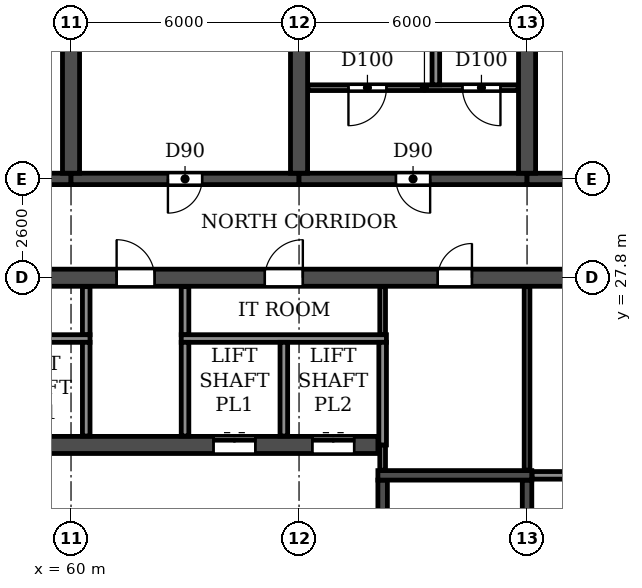
"""IFC4 building model, lengths in metres.
Left out: names, types, materials, properties, quantities, classifications, styles, units other than length and angle.
Written with IfcOpenShell. Run it as: python <this file> out.ifc"""

import sys

from ifc_helpers import new_model, si_unit, direction, frame, frame_2d, origin, place, context, subcontext, project, spatial, rectangle, extrude, element, fill, save


model = new_model("IFC4")
c1 = context("Model", 3, precision=1e-05, world=origin(), true_north=direction((0.0, 1.0)))
c2 = subcontext(c1, "Body", "Model", "MODEL_VIEW")
j1 = project(units=[si_unit("LENGTHUNIT", "METRE"), si_unit("PLANEANGLEUNIT", "RADIAN")], contexts=[c1])
p1 = place(None, origin())
s1 = spatial("IfcSite", under=j1, at=p1, CompositionType="ELEMENT")
p2 = place(p1, origin())
s2 = spatial("IfcBuilding", under=s1, at=p2, CompositionType="ELEMENT")
p3 = place(p2, frame((0.0, 0.0, 10.8)))
s3 = spatial("IfcBuildingStorey", under=s2, at=p3, CompositionType="ELEMENT", Elevation=10.8)
for number, where, z_axis, x_axis in (
    (1, (60.0, 30.55, 0.0), (0.0, 0.0, 1.0), (0.0, 1.0, 0.0)),
    (2, (66.0, 30.55, 0.0), (0.0, 0.0, 1.0), (0.0, 1.0, 0.0)),
    (3, (72.0, 30.55, 0.0), (0.0, 0.0, 1.0), (0.0, 1.0, 0.0)),
):
    element("IfcWall", number, at=place(p3, frame(where, z_axis=z_axis, x_axis=x_axis)), inside=s3, PredefinedType="SHEAR", context=c2, shape_type="SweptSolid", body=[
        extrude(rectangle(XDim=14.05, YDim=0.45, at=frame_2d((7.025, 0.0))), origin(), (0.0, 0.0, 1.0), 3.92),
    ])
p4 = place(p3, frame((54.0, 30.4, 0.0), z_axis=(0.0, 0.0, 1.0), x_axis=(1.0, 0.0, 0.0)))
e4 = element("IfcWall", 4, at=p4, inside=s3, PredefinedType="SHEAR", context=c2, shape_type="SweptSolid", body=[
    extrude(rectangle(XDim=6.0, YDim=0.3, at=frame_2d((3.0, 0.0))), origin(), (0.0, 0.0, 1.0), 3.32),
])
p5 = place(p4, frame((1.4, 0.0, 0.0)))
e5 = element("IfcOpeningElement", 5, at=p5, cuts=e4, PredefinedType="OPENING", context=c2, shape_type="SweptSolid", body=[
    extrude(rectangle(XDim=1.0, YDim=2.1, at=frame_2d((0.5, 1.05))), frame((0.0, 0.16, 0.0), z_axis=(0.0, -1.0, 0.0), x_axis=(1.0, 0.0, 0.0)), (0.0, 0.0, 1.0), 0.32),
])
p6 = place(p4, frame((4.45, 0.0, 0.0)))
e6 = element("IfcOpeningElement", 6, at=p6, cuts=e4, PredefinedType="OPENING", context=c2, shape_type="SweptSolid", body=[
    extrude(rectangle(XDim=0.9, YDim=2.1, at=frame_2d((0.45, 1.05))), frame((0.0, 0.16, 0.0), z_axis=(0.0, -1.0, 0.0), x_axis=(1.0, 0.0, 0.0)), (0.0, 0.0, 1.0), 0.32),
])
p7 = place(p3, frame((60.0, 30.4, 0.0), z_axis=(0.0, 0.0, 1.0), x_axis=(1.0, 0.0, 0.0)))
e7 = element("IfcWall", 7, at=p7, inside=s3, PredefinedType="SHEAR", context=c2, shape_type="SweptSolid", body=[
    extrude(rectangle(XDim=6.0, YDim=0.3, at=frame_2d((3.0, 0.0))), origin(), (0.0, 0.0, 1.0), 3.32),
])
p8 = place(p7, frame((2.55, 0.0, 0.0)))
e8 = element("IfcOpeningElement", 8, at=p8, cuts=e7, PredefinedType="OPENING", context=c2, shape_type="SweptSolid", body=[
    extrude(rectangle(XDim=0.9, YDim=2.1, at=frame_2d((0.45, 1.05))), frame((0.0, 0.16, 0.0), z_axis=(0.0, -1.0, 0.0), x_axis=(1.0, 0.0, 0.0)), (0.0, 0.0, 1.0), 0.32),
])
p9 = place(p3, frame((66.0, 30.4, 0.0), z_axis=(0.0, 0.0, 1.0), x_axis=(1.0, 0.0, 0.0)))
e9 = element("IfcWall", 9, at=p9, inside=s3, PredefinedType="SHEAR", context=c2, shape_type="SweptSolid", body=[
    extrude(rectangle(XDim=6.0, YDim=0.3, at=frame_2d((3.0, 0.0))), origin(), (0.0, 0.0, 1.0), 3.32),
])
p10 = place(p9, frame((2.55, 0.0, 0.0)))
e10 = element("IfcOpeningElement", 10, at=p10, cuts=e9, PredefinedType="OPENING", context=c2, shape_type="SweptSolid", body=[
    extrude(rectangle(XDim=0.9, YDim=2.1, at=frame_2d((0.45, 1.05))), frame((0.0, 0.16, 0.0), z_axis=(0.0, -1.0, 0.0), x_axis=(1.0, 0.0, 0.0)), (0.0, 0.0, 1.0), 0.32),
])
p11 = place(p3, frame((72.0, 30.4, 0.0), z_axis=(0.0, 0.0, 1.0), x_axis=(1.0, 0.0, 0.0)))
e11 = element("IfcWall", 11, at=p11, inside=s3, PredefinedType="SHEAR", context=c2, shape_type="SweptSolid", body=[
    extrude(rectangle(XDim=6.0, YDim=0.3, at=frame_2d((3.0, 0.0))), origin(), (0.0, 0.0, 1.0), 3.32),
])
p12 = place(p11, frame((2.55, 0.0, 0.0)))
e12 = element("IfcOpeningElement", 12, at=p12, cuts=e11, PredefinedType="OPENING", context=c2, shape_type="SweptSolid", body=[
    extrude(rectangle(XDim=0.9, YDim=2.1, at=frame_2d((0.45, 1.05))), frame((0.0, 0.16, 0.0), z_axis=(0.0, -1.0, 0.0), x_axis=(1.0, 0.0, 0.0)), (0.0, 0.0, 1.0), 0.32),
])
p13 = place(p3, frame((18.0, 27.8, 0.0), z_axis=(0.0, 0.0, 1.0), x_axis=(1.0, 0.0, 0.0)))
e13 = element("IfcWall", 13, at=p13, inside=s3, PredefinedType="SOLIDWALL", context=c2, shape_type="SweptSolid", body=[
    extrude(rectangle(XDim=66.0, YDim=0.45, at=frame_2d((33.0, 0.0))), origin(), (0.0, 0.0, 1.0), 3.92),
])
p14 = place(p13, frame((0.9, 0.0, 0.0)))
e14 = element("IfcOpeningElement", 14, at=p14, cuts=e13, PredefinedType="OPENING", context=c2, shape_type="SweptSolid", body=[
    extrude(rectangle(XDim=1.0, YDim=2.1, at=frame_2d((0.5, 1.05))), frame((0.0, 0.235, 0.0), z_axis=(0.0, -1.0, 0.0), x_axis=(1.0, 0.0, 0.0)), (0.0, 0.0, 1.0), 0.47),
])
p15 = place(p13, frame((4.25, 0.0, 0.0)))
e15 = element("IfcOpeningElement", 15, at=p15, cuts=e13, PredefinedType="OPENING", context=c2, shape_type="SweptSolid", body=[
    extrude(rectangle(XDim=0.9, YDim=2.1, at=frame_2d((0.45, 1.05))), frame((0.0, 0.235, 0.0), z_axis=(0.0, -1.0, 0.0), x_axis=(1.0, 0.0, 0.0)), (0.0, 0.0, 1.0), 0.47),
])
p16 = place(p13, frame((8.85, 0.0, 0.0)))
e16 = element("IfcOpeningElement", 16, at=p16, cuts=e13, PredefinedType="OPENING", context=c2, shape_type="SweptSolid", body=[
    extrude(rectangle(XDim=0.9, YDim=2.1, at=frame_2d((0.45, 1.05))), frame((0.0, 0.235, 0.0), z_axis=(0.0, -1.0, 0.0), x_axis=(1.0, 0.0, 0.0)), (0.0, 0.0, 1.0), 0.47),
])
p17 = place(p13, frame((13.45, 0.0, 0.0)))
e17 = element("IfcOpeningElement", 17, at=p17, cuts=e13, PredefinedType="OPENING", context=c2, shape_type="SweptSolid", body=[
    extrude(rectangle(XDim=0.9, YDim=2.1, at=frame_2d((0.45, 1.05))), frame((0.0, 0.235, 0.0), z_axis=(0.0, -1.0, 0.0), x_axis=(1.0, 0.0, 0.0)), (0.0, 0.0, 1.0), 0.47),
])
p18 = place(p13, frame((18.95, 0.0, 0.0)))
e18 = element("IfcOpeningElement", 18, at=p18, cuts=e13, PredefinedType="OPENING", context=c2, shape_type="SweptSolid", body=[
    extrude(rectangle(XDim=1.5, YDim=2.1, at=frame_2d((0.75, 1.05))), frame((0.0, 0.235, 0.0), z_axis=(0.0, -1.0, 0.0), x_axis=(1.0, 0.0, 0.0)), (0.0, 0.0, 1.0), 0.47),
])
p19 = place(p13, frame((24.4, 0.0, 0.0)))
e19 = element("IfcOpeningElement", 19, at=p19, cuts=e13, PredefinedType="OPENING", context=c2, shape_type="SweptSolid", body=[
    extrude(rectangle(XDim=1.0, YDim=2.1, at=frame_2d((0.5, 1.05))), frame((0.0, 0.235, 0.0), z_axis=(0.0, -1.0, 0.0), x_axis=(1.0, 0.0, 0.0)), (0.0, 0.0, 1.0), 0.47),
])
p20 = place(p13, frame((29.6, 0.0, 0.0)))
e20 = element("IfcOpeningElement", 20, at=p20, cuts=e13, PredefinedType="OPENING", context=c2, shape_type="SweptSolid", body=[
    extrude(rectangle(XDim=1.0, YDim=2.1, at=frame_2d((0.5, 1.05))), frame((0.0, 0.235, 0.0), z_axis=(0.0, -1.0, 0.0), x_axis=(1.0, 0.0, 0.0)), (0.0, 0.0, 1.0), 0.47),
])
p21 = place(p13, frame((32.5, 0.0, 0.0)))
e21 = element("IfcOpeningElement", 21, at=p21, cuts=e13, PredefinedType="OPENING", context=c2, shape_type="SweptSolid", body=[
    extrude(rectangle(XDim=1.0, YDim=2.1, at=frame_2d((0.5, 1.05))), frame((0.0, 0.235, 0.0), z_axis=(0.0, -1.0, 0.0), x_axis=(1.0, 0.0, 0.0)), (0.0, 0.0, 1.0), 0.47),
])
p22 = place(p13, frame((38.0, 0.0, 0.0)))
e22 = element("IfcOpeningElement", 22, at=p22, cuts=e13, PredefinedType="OPENING", context=c2, shape_type="SweptSolid", body=[
    extrude(rectangle(XDim=1.0, YDim=2.1, at=frame_2d((0.5, 1.05))), frame((0.0, 0.235, 0.0), z_axis=(0.0, -1.0, 0.0), x_axis=(1.0, 0.0, 0.0)), (0.0, 0.0, 1.0), 0.47),
])
p23 = place(p13, frame((43.2, 0.0, 0.0)))
e23 = element("IfcOpeningElement", 23, at=p23, cuts=e13, PredefinedType="OPENING", context=c2, shape_type="SweptSolid", body=[
    extrude(rectangle(XDim=1.0, YDim=2.1, at=frame_2d((0.5, 1.05))), frame((0.0, 0.235, 0.0), z_axis=(0.0, -1.0, 0.0), x_axis=(1.0, 0.0, 0.0)), (0.0, 0.0, 1.0), 0.47),
])
p24 = place(p13, frame((47.1, 0.0, 0.0)))
e24 = element("IfcOpeningElement", 24, at=p24, cuts=e13, PredefinedType="OPENING", context=c2, shape_type="SweptSolid", body=[
    extrude(rectangle(XDim=1.0, YDim=2.1, at=frame_2d((0.5, 1.05))), frame((0.0, 0.235, 0.0), z_axis=(0.0, -1.0, 0.0), x_axis=(1.0, 0.0, 0.0)), (0.0, 0.0, 1.0), 0.47),
])
p25 = place(p13, frame((51.65, 0.0, 0.0)))
e25 = element("IfcOpeningElement", 25, at=p25, cuts=e13, PredefinedType="OPENING", context=c2, shape_type="SweptSolid", body=[
    extrude(rectangle(XDim=0.9, YDim=2.1, at=frame_2d((0.45, 1.05))), frame((0.0, 0.235, 0.0), z_axis=(0.0, -1.0, 0.0), x_axis=(1.0, 0.0, 0.0)), (0.0, 0.0, 1.0), 0.47),
])
p26 = place(p13, frame((56.2, 0.0, 0.0)))
e26 = element("IfcOpeningElement", 26, at=p26, cuts=e13, PredefinedType="OPENING", context=c2, shape_type="SweptSolid", body=[
    extrude(rectangle(XDim=1.0, YDim=2.1, at=frame_2d((0.5, 1.05))), frame((0.0, 0.235, 0.0), z_axis=(0.0, -1.0, 0.0), x_axis=(1.0, 0.0, 0.0)), (0.0, 0.0, 1.0), 0.47),
])
p27 = place(p13, frame((60.85, 0.0, 0.0)))
e27 = element("IfcOpeningElement", 27, at=p27, cuts=e13, PredefinedType="OPENING", context=c2, shape_type="SweptSolid", body=[
    extrude(rectangle(XDim=0.9, YDim=2.1, at=frame_2d((0.45, 1.05))), frame((0.0, 0.235, 0.0), z_axis=(0.0, -1.0, 0.0), x_axis=(1.0, 0.0, 0.0)), (0.0, 0.0, 1.0), 0.47),
])
p28 = place(p13, frame((64.1, 0.0, 0.0)))
e28 = element("IfcOpeningElement", 28, at=p28, cuts=e13, PredefinedType="OPENING", context=c2, shape_type="SweptSolid", body=[
    extrude(rectangle(XDim=1.0, YDim=2.1, at=frame_2d((0.5, 1.05))), frame((0.0, 0.235, 0.0), z_axis=(0.0, -1.0, 0.0), x_axis=(1.0, 0.0, 0.0)), (0.0, 0.0, 1.0), 0.47),
])
p29 = place(p3, frame((33.925, 23.4, 0.0), z_axis=(0.0, 0.0, 1.0), x_axis=(1.0, 0.0, 0.0)))
e29 = element("IfcWall", 29, at=p29, inside=s3, PredefinedType="SOLIDWALL", context=c2, shape_type="SweptSolid", body=[
    extrude(rectangle(XDim=34.15, YDim=0.45, at=frame_2d((17.075, 0.0))), origin(), (0.0, 0.0, 1.0), 3.92),
])
p30 = place(p29, frame((16.175, 0.0, 0.0)))
e30 = element("IfcOpeningElement", 30, at=p30, cuts=e29, PredefinedType="OPENING", context=c2, shape_type="SweptSolid", body=[
    extrude(rectangle(XDim=1.8, YDim=2.1, at=frame_2d((0.9, 1.05))), frame((0.0, 0.235, 0.0), z_axis=(0.0, -1.0, 0.0), x_axis=(1.0, 0.0, 0.0)), (0.0, 0.0, 1.0), 0.47),
])
p31 = place(p29, frame((11.025, 0.0, 0.0)))
e31 = element("IfcOpeningElement", 31, at=p31, cuts=e29, PredefinedType="OPENING", context=c2, shape_type="SweptSolid", body=[
    extrude(rectangle(XDim=1.1, YDim=2.1, at=frame_2d((0.55, 1.05))), frame((0.0, 0.235, 0.0), z_axis=(0.0, -1.0, 0.0), x_axis=(1.0, 0.0, 0.0)), (0.0, 0.0, 1.0), 0.47),
])
p32 = place(p29, frame((29.825, 0.0, 0.0)))
e32 = element("IfcOpeningElement", 32, at=p32, cuts=e29, PredefinedType="OPENING", context=c2, shape_type="SweptSolid", body=[
    extrude(rectangle(XDim=1.1, YDim=2.1, at=frame_2d((0.55, 1.05))), frame((0.0, 0.235, 0.0), z_axis=(0.0, -1.0, 0.0), x_axis=(1.0, 0.0, 0.0)), (0.0, 0.0, 1.0), 0.47),
])
p33 = place(p29, frame((32.425, 0.0, 0.0)))
e33 = element("IfcOpeningElement", 33, at=p33, cuts=e29, PredefinedType="OPENING", context=c2, shape_type="SweptSolid", body=[
    extrude(rectangle(XDim=1.1, YDim=2.1, at=frame_2d((0.55, 1.05))), frame((0.0, 0.235, 0.0), z_axis=(0.0, -1.0, 0.0), x_axis=(1.0, 0.0, 0.0)), (0.0, 0.0, 1.0), 0.47),
])
p34 = place(p3, frame((68.2, 14.825, 0.0), z_axis=(0.0, 0.0, 1.0), x_axis=(0.0, 1.0, 0.0)))
e34 = element("IfcWall", 34, at=p34, inside=s3, PredefinedType="SOLIDWALL", context=c2, shape_type="SweptSolid", body=[
    extrude(rectangle(XDim=7.65, YDim=0.25, at=frame_2d((3.825, 0.0))), origin(), (0.0, 0.0, 1.0), 3.92),
])
p35 = place(p34, frame((0.475, 0.0, 0.0)))
e35 = element("IfcOpeningElement", 35, at=p35, cuts=e34, PredefinedType="OPENING", context=c2, shape_type="SweptSolid", body=[
    extrude(rectangle(XDim=1.0, YDim=2.1, at=frame_2d((0.5, 1.05))), frame((0.0, 0.135, 0.0), z_axis=(0.0, -1.0, 0.0), x_axis=(1.0, 0.0, 0.0)), (0.0, 0.0, 1.0), 0.27),
])
p36 = place(p3, frame((72.0, 14.825, 0.0), z_axis=(0.0, 0.0, 1.0), x_axis=(0.0, 1.0, 0.0)))
e36 = element("IfcWall", 36, at=p36, inside=s3, PredefinedType="SOLIDWALL", context=c2, shape_type="SweptSolid", body=[
    extrude(rectangle(XDim=7.65, YDim=0.25, at=frame_2d((3.825, 0.0))), origin(), (0.0, 0.0, 1.0), 3.92),
])
p37 = place(p3, frame((68.075, 22.6, 0.0), z_axis=(0.0, 0.0, 1.0), x_axis=(1.0, 0.0, 0.0)))
e37 = element("IfcWall", 37, at=p37, inside=s3, PredefinedType="SOLIDWALL", context=c2, shape_type="SweptSolid", body=[
    extrude(rectangle(XDim=4.05, YDim=0.25, at=frame_2d((2.025, 0.0))), origin(), (0.0, 0.0, 1.0), 3.92),
])
p38 = place(p3, frame((66.235, 32.8, 0.0), z_axis=(0.0, 0.0, 1.0), x_axis=(1.0, 0.0, 0.0)))
e38 = element("IfcWall", 38, at=p38, inside=s3, PredefinedType="PARTITIONING", context=c2, shape_type="SweptSolid", body=[
    extrude(rectangle(XDim=5.53, YDim=0.15, at=frame_2d((2.765, 0.0))), origin(), (0.0, 0.0, 1.0), 3.92),
])
p39 = place(p38, frame((1.065, 0.0, 0.0)))
e39 = element("IfcOpeningElement", 39, at=p39, cuts=e38, PredefinedType="OPENING", context=c2, shape_type="SweptSolid", body=[
    extrude(rectangle(XDim=1.0, YDim=2.1, at=frame_2d((0.5, 1.05))), frame((0.0, 0.085, 0.0), z_axis=(0.0, -1.0, 0.0), x_axis=(1.0, 0.0, 0.0)), (0.0, 0.0, 1.0), 0.17),
])
p40 = place(p38, frame((4.065, 0.0, 0.0)))
e40 = element("IfcOpeningElement", 40, at=p40, cuts=e38, PredefinedType="OPENING", context=c2, shape_type="SweptSolid", body=[
    extrude(rectangle(XDim=1.0, YDim=2.1, at=frame_2d((0.5, 1.05))), frame((0.0, 0.085, 0.0), z_axis=(0.0, -1.0, 0.0), x_axis=(1.0, 0.0, 0.0)), (0.0, 0.0, 1.0), 0.17),
])
for number, where, z_axis, x_axis in (
    (41, (60.4, 26.3, 0.0), (0.0, 0.0, 1.0), (0.0, 1.0, 0.0)),
    (42, (63.0, 26.3, 0.0), (0.0, 0.0, 1.0), (0.0, 1.0, 0.0)),
):
    element("IfcWall", number, at=place(p3, frame(where, z_axis=z_axis, x_axis=x_axis)), inside=s3, PredefinedType="PARTITIONING", context=c2, shape_type="SweptSolid", body=[
        extrude(rectangle(XDim=1.265, YDim=0.2, at=frame_2d((0.632, 0.0))), origin(), (0.0, 0.0, 1.0), 3.92),
    ])
p41 = place(p3, frame((72.135, 22.6, 0.0), z_axis=(0.0, 0.0, 1.0), x_axis=(1.0, 0.0, 0.0)))
e43 = element("IfcWall", 43, at=p41, inside=s3, PredefinedType="PARTITIONING", context=c2, shape_type="SweptSolid", body=[
    extrude(rectangle(XDim=5.13, YDim=0.2, at=frame_2d((2.565, 0.0))), origin(), (0.0, 0.0, 1.0), 3.92),
])
p42 = place(p3, frame((69.6, 32.875, 0.0), z_axis=(0.0, 0.0, 1.0), x_axis=(0.0, 1.0, 0.0)))
e44 = element("IfcWall", 44, at=p42, inside=s3, PredefinedType="PARTITIONING", context=c2, shape_type="SweptSolid", body=[
    extrude(rectangle(XDim=11.825, YDim=0.2, at=frame_2d((5.913, 0.0))), origin(), (0.0, 0.0, 1.0), 3.92),
])
p43 = place(p3, frame((68.2, 22.735, 0.0), z_axis=(0.0, 0.0, 1.0), x_axis=(0.0, 1.0, 0.0)))
e45 = element("IfcWall", 45, at=p43, inside=s3, PredefinedType="PARTITIONING", context=c2, shape_type="SweptSolid", body=[
    extrude(rectangle(XDim=0.665, YDim=0.15, at=frame_2d((0.333, 0.0))), origin(), (0.0, 0.0, 1.0), 3.92),
])
p44 = place(p3, frame((68.2, 26.3, 0.0), z_axis=(0.0, 0.0, 1.0), x_axis=(0.0, 1.0, 0.0)))
e46 = element("IfcWall", 46, at=p44, inside=s3, PredefinedType="PARTITIONING", context=c2, shape_type="SweptSolid", body=[
    extrude(rectangle(XDim=1.265, YDim=0.15, at=frame_2d((0.632, 0.0))), origin(), (0.0, 0.0, 1.0), 3.92),
])
p45 = place(p3, frame((72.0, 22.735, 0.0), z_axis=(0.0, 0.0, 1.0), x_axis=(0.0, 1.0, 0.0)))
e47 = element("IfcWall", 47, at=p45, inside=s3, PredefinedType="PARTITIONING", context=c2, shape_type="SweptSolid", body=[
    extrude(rectangle(XDim=4.83, YDim=0.15, at=frame_2d((2.415, 0.0))), origin(), (0.0, 0.0, 1.0), 3.92),
])
p46 = place(p3, frame((52.5, 26.2, 0.0), z_axis=(0.0, 0.0, 1.0), x_axis=(1.0, 0.0, 0.0)))
e48 = element("IfcWall", 48, at=p46, inside=s3, PredefinedType="PARTITIONING", context=c2, shape_type="SweptSolid", body=[
    extrude(rectangle(XDim=8.0, YDim=0.2, at=frame_2d((4.0, 0.0))), origin(), (0.0, 0.0, 1.0), 3.92),
])
p47 = place(p3, frame((62.9, 26.2, 0.0), z_axis=(0.0, 0.0, 1.0), x_axis=(1.0, 0.0, 0.0)))
e49 = element("IfcWall", 49, at=p47, inside=s3, PredefinedType="PARTITIONING", context=c2, shape_type="SweptSolid", body=[
    extrude(rectangle(XDim=5.4, YDim=0.2, at=frame_2d((2.7, 0.0))), origin(), (0.0, 0.0, 1.0), 3.92),
])
for number, where, z_axis, x_axis in (
    (50, (60.4, 23.635, 0.0), (0.0, 0.0, 1.0), (0.0, 1.0, 0.0)),
    (51, (63.0, 23.635, 0.0), (0.0, 0.0, 1.0), (0.0, 1.0, 0.0)),
    (52, (65.6, 23.635, 0.0), (0.0, 0.0, 1.0), (0.0, 1.0, 0.0)),
):
    element("IfcWall", number, at=place(p3, frame(where, z_axis=z_axis, x_axis=x_axis)), inside=s3, PredefinedType="PARTITIONING", context=c2, shape_type="SweptSolid", body=[
        extrude(rectangle(XDim=2.465, YDim=0.2, at=frame_2d((1.232, 0.0))), origin(), (0.0, 0.0, 1.0), 3.92),
    ])
p48 = place(p3, frame((68.2, 23.4, 0.0), z_axis=(0.0, 0.0, 1.0), x_axis=(0.0, 1.0, 0.0)))
e53 = element("IfcWall", 53, at=p48, inside=s3, PredefinedType="PARTITIONING", context=c2, shape_type="SweptSolid", body=[
    extrude(rectangle(XDim=2.7, YDim=0.2, at=frame_2d((1.35, 0.0))), origin(), (0.0, 0.0, 1.0), 3.92),
])
p49 = place(p23, origin())
e54 = element("IfcDoor", 54, at=p49, inside=s3, OperationType="SINGLE_SWING_LEFT", PredefinedType="DOOR", context=c2, shape_type="SweptSolid", body=[
    extrude(rectangle(XDim=1.0, YDim=2.1, at=frame_2d((0.5, 1.05))), frame((0.0, 0.025, 0.0), z_axis=(0.0, -1.0, 0.0), x_axis=(1.0, 0.0, 0.0)), (0.0, 0.0, 1.0), 0.05),
])
fill(e23, e54)
p50 = place(p8, frame((0.9, 0.0, 0.0), z_axis=(0.0, 0.0, 1.0), x_axis=(-1.0, 0.0, 0.0)))
e55 = element("IfcDoor", 55, at=p50, inside=s3, OperationType="SINGLE_SWING_RIGHT", PredefinedType="DOOR", context=c2, shape_type="SweptSolid", body=[
    extrude(rectangle(XDim=0.9, YDim=2.1, at=frame_2d((0.45, 1.05))), frame((0.0, 0.025, 0.0), z_axis=(0.0, -1.0, 0.0), x_axis=(1.0, 0.0, 0.0)), (0.0, 0.0, 1.0), 0.05),
])
fill(e8, e55)
p51 = place(p24, origin())
e56 = element("IfcDoor", 56, at=p51, inside=s3, OperationType="SINGLE_SWING_RIGHT", PredefinedType="DOOR", context=c2, shape_type="SweptSolid", body=[
    extrude(rectangle(XDim=1.0, YDim=2.1, at=frame_2d((0.5, 1.05))), frame((0.0, 0.025, 0.0), z_axis=(0.0, -1.0, 0.0), x_axis=(1.0, 0.0, 0.0)), (0.0, 0.0, 1.0), 0.05),
])
fill(e24, e56)
p52 = place(p10, frame((0.9, 0.0, 0.0), z_axis=(0.0, 0.0, 1.0), x_axis=(-1.0, 0.0, 0.0)))
e57 = element("IfcDoor", 57, at=p52, inside=s3, OperationType="SINGLE_SWING_LEFT", PredefinedType="DOOR", context=c2, shape_type="SweptSolid", body=[
    extrude(rectangle(XDim=0.9, YDim=2.1, at=frame_2d((0.45, 1.05))), frame((0.0, 0.025, 0.0), z_axis=(0.0, -1.0, 0.0), x_axis=(1.0, 0.0, 0.0)), (0.0, 0.0, 1.0), 0.05),
])
fill(e10, e57)
p53 = place(p25, origin())
e58 = element("IfcDoor", 58, at=p53, inside=s3, OperationType="SINGLE_SWING_RIGHT", PredefinedType="DOOR", context=c2, shape_type="SweptSolid", body=[
    extrude(rectangle(XDim=0.9, YDim=2.1, at=frame_2d((0.45, 1.05))), frame((0.0, 0.025, 0.0), z_axis=(0.0, -1.0, 0.0), x_axis=(1.0, 0.0, 0.0)), (0.0, 0.0, 1.0), 0.05),
])
fill(e25, e58)
p54 = place(p39, frame((1.0, 0.0, 0.0), z_axis=(0.0, 0.0, 1.0), x_axis=(-1.0, 0.0, 0.0)))
e59 = element("IfcDoor", 59, at=p54, inside=s3, OperationType="SINGLE_SWING_RIGHT", PredefinedType="DOOR", context=c2, shape_type="SweptSolid", body=[
    extrude(rectangle(XDim=1.0, YDim=2.1, at=frame_2d((0.5, 1.05))), frame((0.0, 0.025, 0.0), z_axis=(0.0, -1.0, 0.0), x_axis=(1.0, 0.0, 0.0)), (0.0, 0.0, 1.0), 0.05),
])
fill(e39, e59)
p55 = place(p40, frame((1.0, 0.0, 0.0), z_axis=(0.0, 0.0, 1.0), x_axis=(-1.0, 0.0, 0.0)))
e60 = element("IfcDoor", 60, at=p55, inside=s3, OperationType="SINGLE_SWING_LEFT", PredefinedType="DOOR", context=c2, shape_type="SweptSolid", body=[
    extrude(rectangle(XDim=1.0, YDim=2.1, at=frame_2d((0.5, 1.05))), frame((0.0, 0.025, 0.0), z_axis=(0.0, -1.0, 0.0), x_axis=(1.0, 0.0, 0.0)), (0.0, 0.0, 1.0), 0.05),
])
fill(e40, e60)
p56 = place(p32, origin())
e61 = element("IfcDoor", 61, at=p56, inside=s3, OperationType="DOUBLE_DOOR_SLIDING", PredefinedType="DOOR", context=c2, shape_type="SweptSolid", body=[
    extrude(rectangle(XDim=1.1, YDim=2.1, at=frame_2d((0.55, 1.05))), frame((0.0, 0.025, 0.0), z_axis=(0.0, -1.0, 0.0), x_axis=(1.0, 0.0, 0.0)), (0.0, 0.0, 1.0), 0.05),
])
fill(e32, e61)
p57 = place(p33, origin())
e62 = element("IfcDoor", 62, at=p57, inside=s3, OperationType="DOUBLE_DOOR_SLIDING", PredefinedType="DOOR", context=c2, shape_type="SweptSolid", body=[
    extrude(rectangle(XDim=1.1, YDim=2.1, at=frame_2d((0.55, 1.05))), frame((0.0, 0.025, 0.0), z_axis=(0.0, -1.0, 0.0), x_axis=(1.0, 0.0, 0.0)), (0.0, 0.0, 1.0), 0.05),
])
fill(e33, e62)
save(model, sys.argv[1])
